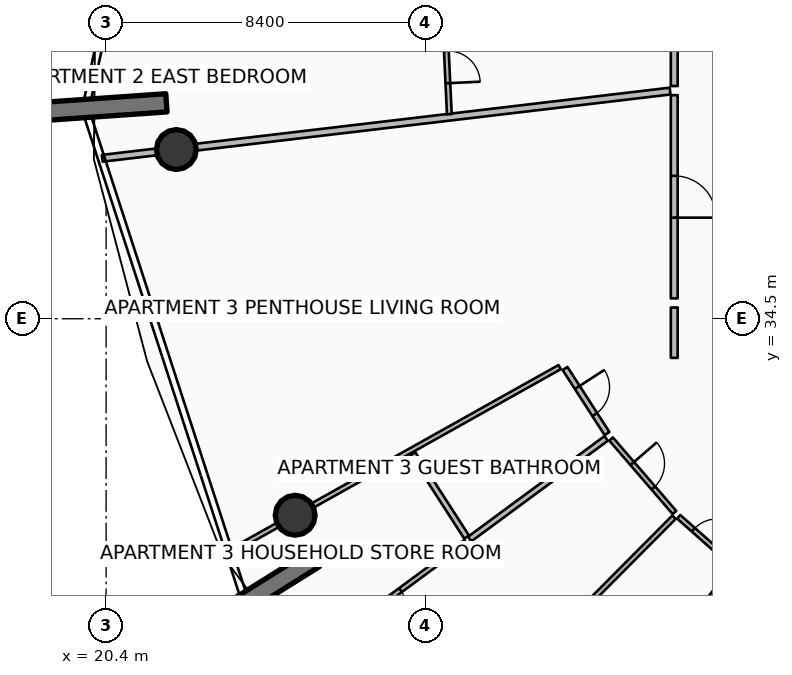
"""IFC4 building model, lengths in metres.
Left out: names, types, materials, properties, quantities, classifications, styles, units other than length and angle.
Written with IfcOpenShell. Run it as: python <this file> out.ifc"""

import sys

from ifc_helpers import new_model, si_unit, direction, frame, frame_2d, origin, origin_2d, place, context, subcontext, project, spatial, rectangle, circle, extrude, element, fill, save


model = new_model("IFC4")
c1 = context("Model", 3, precision=1e-05, world=origin(), true_north=direction((0.0, 1.0)))
c2 = subcontext(c1, "Body", "Model", "MODEL_VIEW")
j1 = project(units=[si_unit("LENGTHUNIT", "METRE"), si_unit("PLANEANGLEUNIT", "RADIAN")], contexts=[c1])
p1 = place(None, origin())
s1 = spatial("IfcSite", under=j1, at=p1, CompositionType="ELEMENT")
p2 = place(p1, origin())
s2 = spatial("IfcBuilding", under=s1, at=p2, CompositionType="ELEMENT")
p3 = place(p2, frame((0.0, 0.0, 176.55)))
s3 = spatial("IfcBuildingStorey", under=s2, at=p3, CompositionType="ELEMENT", Elevation=176.55)
p4 = place(p3, frame((21.987, 40.181, 0.0), z_axis=(0.0, 0.0, 1.0), x_axis=(-0.997568676264, -0.069690287244, 0.0)))
e1 = element("IfcWall", 1, at=p4, inside=s3, PredefinedType="SOLIDWALL", context=c2, shape_type="SweptSolid", body=[
    extrude(rectangle(XDim=3.5, YDim=0.48, at=frame_2d((1.75, 0.0))), origin(), (0.0, 0.0, 1.0), 3.75),
])
p5 = place(p3, frame((25.886, 28.182, 0.0), z_axis=(0.0, 0.0, 1.0), x_axis=(-0.848033572426, -0.529942506352, 0.0)))
e2 = element("IfcWall", 2, at=p5, inside=s3, PredefinedType="SOLIDWALL", context=c2, shape_type="SweptSolid", body=[
    extrude(rectangle(XDim=3.5, YDim=0.48, at=frame_2d((1.75, 0.0))), origin(), (0.0, 0.0, 1.0), 3.75),
])
for number, where, z_axis, x_axis in (
    (3, (22.248, 38.952, 0.0), (0.0, 0.0, 1.0), (1.0, 0.0, 0.0)),
    (4, (25.375, 29.329, 0.0), (0.0, 0.0, 1.0), (1.0, 0.0, 0.0)),
):
    element("IfcColumn", number, at=place(p3, frame(where, z_axis=z_axis, x_axis=x_axis)), inside=s3, PredefinedType="COLUMN", context=c2, shape_type="SweptSolid", body=[
        extrude(circle(Radius=0.525, at=origin_2d()), origin(), (0.0, 0.0, 1.0), 3.5),
    ])
p6 = place(p3, frame((35.241, 40.49, 0.0), z_axis=(0.0, 0.0, 1.0), x_axis=(-0.993066731786, -0.117551972417, 0.0)))
e5 = element("IfcWall", 5, at=p6, inside=s3, PredefinedType="PARTITIONING", context=c2, shape_type="SweptSolid", body=[
    extrude(rectangle(XDim=15.047, YDim=0.18, at=frame_2d((7.523, 0.0))), origin(), (0.0, 0.0, 1.0), 2.94),
])
p7 = place(p3, frame((35.35, 45.448, 0.0), z_axis=(0.0, 0.0, 1.0), x_axis=(0.0, -1.0, 0.0)))
e6 = element("IfcWall", 6, at=p7, inside=s3, PredefinedType="PARTITIONING", context=c2, shape_type="SweptSolid", body=[
    extrude(rectangle(XDim=4.825, YDim=0.18, at=frame_2d((2.413, 0.0))), origin(), (0.0, 0.0, 1.0), 2.94),
])
p8 = place(p3, frame((29.315, 42.361, 0.0), z_axis=(0.0, 0.0, 1.0), x_axis=(0.047144289587, -0.998888089808, 0.0)))
e7 = element("IfcWall", 7, at=p8, inside=s3, PredefinedType="PARTITIONING", context=c2, shape_type="SweptSolid", body=[
    extrude(rectangle(XDim=2.48, YDim=0.125, at=frame_2d((1.24, 0.0))), origin(), (0.0, 0.0, 1.0), 2.94),
])
p9 = place(p8, frame((0.815, 0.0, 0.0)))
e8 = element("IfcOpeningElement", 8, at=p9, cuts=e7, PredefinedType="OPENING", context=c2, shape_type="SweptSolid", body=[
    extrude(rectangle(XDim=0.85, YDim=2.06, at=frame_2d((0.425, 1.03))), frame((0.0, 0.073, 0.0), z_axis=(0.0, -1.0, 0.0), x_axis=(1.0, 0.0, 0.0)), (0.0, 0.0, 1.0), 0.145),
])
p10 = place(p3, frame((35.35, 40.383, 0.0), z_axis=(0.0, 0.0, 1.0), x_axis=(0.0, -1.0, 0.0)))
e9 = element("IfcWall", 9, at=p10, inside=s3, PredefinedType="PARTITIONING", context=c2, shape_type="SweptSolid", body=[
    extrude(rectangle(XDim=5.347, YDim=0.18, at=frame_2d((2.674, 0.0))), origin(), (0.0, 0.0, 1.0), 2.94),
])
p11 = place(p10, frame((2.124, 0.0, 0.0)))
e10 = element("IfcOpeningElement", 10, at=p11, cuts=e9, PredefinedType="OPENING", context=c2, shape_type="SweptSolid", body=[
    extrude(rectangle(XDim=1.1, YDim=2.1, at=frame_2d((0.55, 1.05))), frame((0.0, 0.1, 0.0), z_axis=(0.0, -1.0, 0.0), x_axis=(1.0, 0.0, 0.0)), (0.0, 0.0, 1.0), 0.2),
])
p12 = place(p3, frame((35.35, 34.796, 0.0), z_axis=(0.0, 0.0, 1.0), x_axis=(0.0, -1.0, 0.0)))
e11 = element("IfcWall", 11, at=p12, inside=s3, PredefinedType="PARTITIONING", context=c2, shape_type="SweptSolid", body=[
    extrude(rectangle(XDim=1.326, YDim=0.18, at=frame_2d((0.663, 0.0))), origin(), (0.0, 0.0, 1.0), 2.94),
])
p13 = place(p3, frame((32.334, 33.227, 0.0), z_axis=(0.0, 0.0, 1.0), x_axis=(-0.872500152392, -0.488613839424, 0.0)))
e12 = element("IfcWall", 12, at=p13, inside=s3, PredefinedType="PARTITIONING", context=c2, shape_type="SweptSolid", body=[
    extrude(rectangle(XDim=9.94, YDim=0.125, at=frame_2d((4.97, 0.0))), origin(), (0.0, 0.0, 1.0), 2.94),
])
p14 = place(p3, frame((32.476, 33.192, 0.0), z_axis=(0.0, 0.0, 1.0), x_axis=(0.542143239932, -0.840286086637, 0.0)))
e13 = element("IfcWall", 13, at=p14, inside=s3, PredefinedType="PARTITIONING", context=c2, shape_type="SweptSolid", body=[
    extrude(rectangle(XDim=2.038, YDim=0.15, at=frame_2d((1.019, 0.0))), origin(), (0.0, 0.0, 1.0), 2.94),
])
p15 = place(p14, frame((0.594, 0.0, 0.0)))
e14 = element("IfcOpeningElement", 14, at=p15, cuts=e13, PredefinedType="OPENING", context=c2, shape_type="SweptSolid", body=[
    extrude(rectangle(XDim=0.85, YDim=2.06, at=frame_2d((0.425, 1.03))), frame((0.0, 0.085, 0.0), z_axis=(0.0, -1.0, 0.0), x_axis=(1.0, 0.0, 0.0)), (0.0, 0.0, 1.0), 0.17),
])
p16 = place(p3, frame((28.471, 30.949, 0.0), z_axis=(0.0, 0.0, 1.0), x_axis=(0.542080018781, -0.840326872853, 0.0)))
e15 = element("IfcWall", 15, at=p16, inside=s3, PredefinedType="PARTITIONING", context=c2, shape_type="SweptSolid", body=[
    extrude(rectangle(XDim=2.611, YDim=0.15, at=frame_2d((1.306, 0.0))), origin(), (0.0, 0.0, 1.0), 2.94),
])
p17 = place(p3, frame((33.557, 31.35, 0.0), z_axis=(0.0, 0.0, 1.0), x_axis=(-0.804841149106, -0.593490290322, 0.0)))
e16 = element("IfcWall", 16, at=p17, inside=s3, PredefinedType="PARTITIONING", context=c2, shape_type="SweptSolid", body=[
    extrude(rectangle(XDim=4.46, YDim=0.15, at=frame_2d((2.23, 0.0))), origin(), (0.0, 0.0, 1.0), 2.94),
])
p18 = place(p3, frame((29.863, 28.626, 0.0), z_axis=(0.0, 0.0, 1.0), x_axis=(-0.804842237675, -0.593488814094, 0.0)))
e17 = element("IfcWall", 17, at=p18, inside=s3, PredefinedType="PARTITIONING", context=c2, shape_type="SweptSolid", body=[
    extrude(rectangle(XDim=5.115, YDim=0.125, at=frame_2d((2.558, 0.0))), origin(), (0.0, 0.0, 1.0), 2.94),
])
p19 = place(p18, frame((2.133, 0.0, 0.0)))
e18 = element("IfcOpeningElement", 18, at=p19, cuts=e17, PredefinedType="OPENING", context=c2, shape_type="SweptSolid", body=[
    extrude(rectangle(XDim=0.85, YDim=2.06, at=frame_2d((0.425, 1.03))), frame((0.0, 0.073, 0.0), z_axis=(0.0, -1.0, 0.0), x_axis=(1.0, 0.0, 0.0)), (0.0, 0.0, 1.0), 0.145),
])
p20 = place(p3, frame((35.344, 29.277, 0.0), z_axis=(0.0, 0.0, 1.0), x_axis=(-0.705226489462, -0.708982086206, 0.0)))
e19 = element("IfcWall", 19, at=p20, inside=s3, PredefinedType="PARTITIONING", context=c2, shape_type="SweptSolid", body=[
    extrude(rectangle(XDim=9.166, YDim=0.125, at=frame_2d((4.583, 0.0))), origin(), (0.0, 0.0, 1.0), 2.94),
])
p21 = place(p3, frame((33.688, 31.335, 0.0), z_axis=(0.0, 0.0, 1.0), x_axis=(0.653119308398, -0.757255022431, 0.0)))
e20 = element("IfcWall", 20, at=p21, inside=s3, PredefinedType="PARTITIONING", context=c2, shape_type="SweptSolid", body=[
    extrude(rectangle(XDim=2.553, YDim=0.125, at=frame_2d((1.277, 0.0))), origin(), (0.0, 0.0, 1.0), 2.94),
])
p22 = place(p21, frame((0.852, 0.0, 0.0)))
e21 = element("IfcOpeningElement", 21, at=p22, cuts=e20, PredefinedType="OPENING", context=c2, shape_type="SweptSolid", body=[
    extrude(rectangle(XDim=0.85, YDim=2.06, at=frame_2d((0.425, 1.03))), frame((0.0, 0.073, 0.0), z_axis=(0.0, -1.0, 0.0), x_axis=(1.0, 0.0, 0.0)), (0.0, 0.0, 1.0), 0.145),
])
p23 = place(p3, frame((35.468, 29.288, 0.0), z_axis=(0.0, 0.0, 1.0), x_axis=(0.748399816021, -0.663247853656, 0.0)))
e22 = element("IfcWall", 22, at=p23, inside=s3, PredefinedType="PARTITIONING", context=c2, shape_type="SweptSolid", body=[
    extrude(rectangle(XDim=1.875, YDim=0.125, at=frame_2d((0.938, 0.0))), origin(), (0.0, 0.0, 1.0), 2.94),
])
p24 = place(p23, frame((0.512, 0.0, 0.0)))
e23 = element("IfcOpeningElement", 23, at=p24, cuts=e22, PredefinedType="OPENING", context=c2, shape_type="SweptSolid", body=[
    extrude(rectangle(XDim=0.85, YDim=2.06, at=frame_2d((0.425, 1.03))), frame((0.0, 0.073, 0.0), z_axis=(0.0, -1.0, 0.0), x_axis=(1.0, 0.0, 0.0)), (0.0, 0.0, 1.0), 0.145),
])
p25 = place(p3, frame((36.884, 27.9, 0.0), z_axis=(0.0, 0.0, 1.0), x_axis=(-0.619094580594, -0.785316433216, 0.0)))
e24 = element("IfcWall", 24, at=p25, inside=s3, PredefinedType="PARTITIONING", context=c2, shape_type="SweptSolid", body=[
    extrude(rectangle(XDim=9.175, YDim=0.125, at=frame_2d((4.588, 0.0))), origin(), (0.0, 0.0, 1.0), 2.94),
])
p26 = place(p9, origin())
e25 = element("IfcDoor", 25, at=p26, inside=s3, OperationType="SINGLE_SWING_RIGHT", PredefinedType="DOOR", context=c2, shape_type="SweptSolid", body=[
    extrude(rectangle(XDim=0.85, YDim=2.06, at=frame_2d((0.425, 1.03))), frame((0.0, 0.025, 0.0), z_axis=(0.0, -1.0, 0.0), x_axis=(1.0, 0.0, 0.0)), (0.0, 0.0, 1.0), 0.05),
])
fill(e8, e25)
p27 = place(p11, origin())
e26 = element("IfcDoor", 26, at=p27, inside=s3, OperationType="SINGLE_SWING_RIGHT", PredefinedType="DOOR", context=c2, shape_type="SweptSolid", body=[
    extrude(rectangle(XDim=1.1, YDim=2.1, at=frame_2d((0.55, 1.05))), frame((0.0, 0.025, 0.0), z_axis=(0.0, -1.0, 0.0), x_axis=(1.0, 0.0, 0.0)), (0.0, 0.0, 1.0), 0.05),
])
fill(e10, e26)
p28 = place(p15, origin())
e27 = element("IfcDoor", 27, at=p28, inside=s3, OperationType="SINGLE_SWING_LEFT", PredefinedType="DOOR", context=c2, shape_type="SweptSolid", body=[
    extrude(rectangle(XDim=0.85, YDim=2.06, at=frame_2d((0.425, 1.03))), frame((0.0, 0.025, 0.0), z_axis=(0.0, -1.0, 0.0), x_axis=(1.0, 0.0, 0.0)), (0.0, 0.0, 1.0), 0.05),
])
fill(e14, e27)
p29 = place(p19, origin())
e28 = element("IfcDoor", 28, at=p29, inside=s3, OperationType="SINGLE_SWING_RIGHT", PredefinedType="DOOR", context=c2, shape_type="SweptSolid", body=[
    extrude(rectangle(XDim=0.85, YDim=2.06, at=frame_2d((0.425, 1.03))), frame((0.0, 0.025, 0.0), z_axis=(0.0, -1.0, 0.0), x_axis=(1.0, 0.0, 0.0)), (0.0, 0.0, 1.0), 0.05),
])
fill(e18, e28)
p30 = place(p22, origin())
e29 = element("IfcDoor", 29, at=p30, inside=s3, OperationType="SINGLE_SWING_LEFT", PredefinedType="DOOR", context=c2, shape_type="SweptSolid", body=[
    extrude(rectangle(XDim=0.85, YDim=2.06, at=frame_2d((0.425, 1.03))), frame((0.0, 0.025, 0.0), z_axis=(0.0, -1.0, 0.0), x_axis=(1.0, 0.0, 0.0)), (0.0, 0.0, 1.0), 0.05),
])
fill(e21, e29)
p31 = place(p24, origin())
e30 = element("IfcDoor", 30, at=p31, inside=s3, OperationType="SINGLE_SWING_RIGHT", PredefinedType="DOOR", context=c2, shape_type="SweptSolid", body=[
    extrude(rectangle(XDim=0.85, YDim=2.06, at=frame_2d((0.425, 1.03))), frame((0.0, 0.025, 0.0), z_axis=(0.0, -1.0, 0.0), x_axis=(1.0, 0.0, 0.0)), (0.0, 0.0, 1.0), 0.05),
])
fill(e23, e30)
save(model, sys.argv[1])
